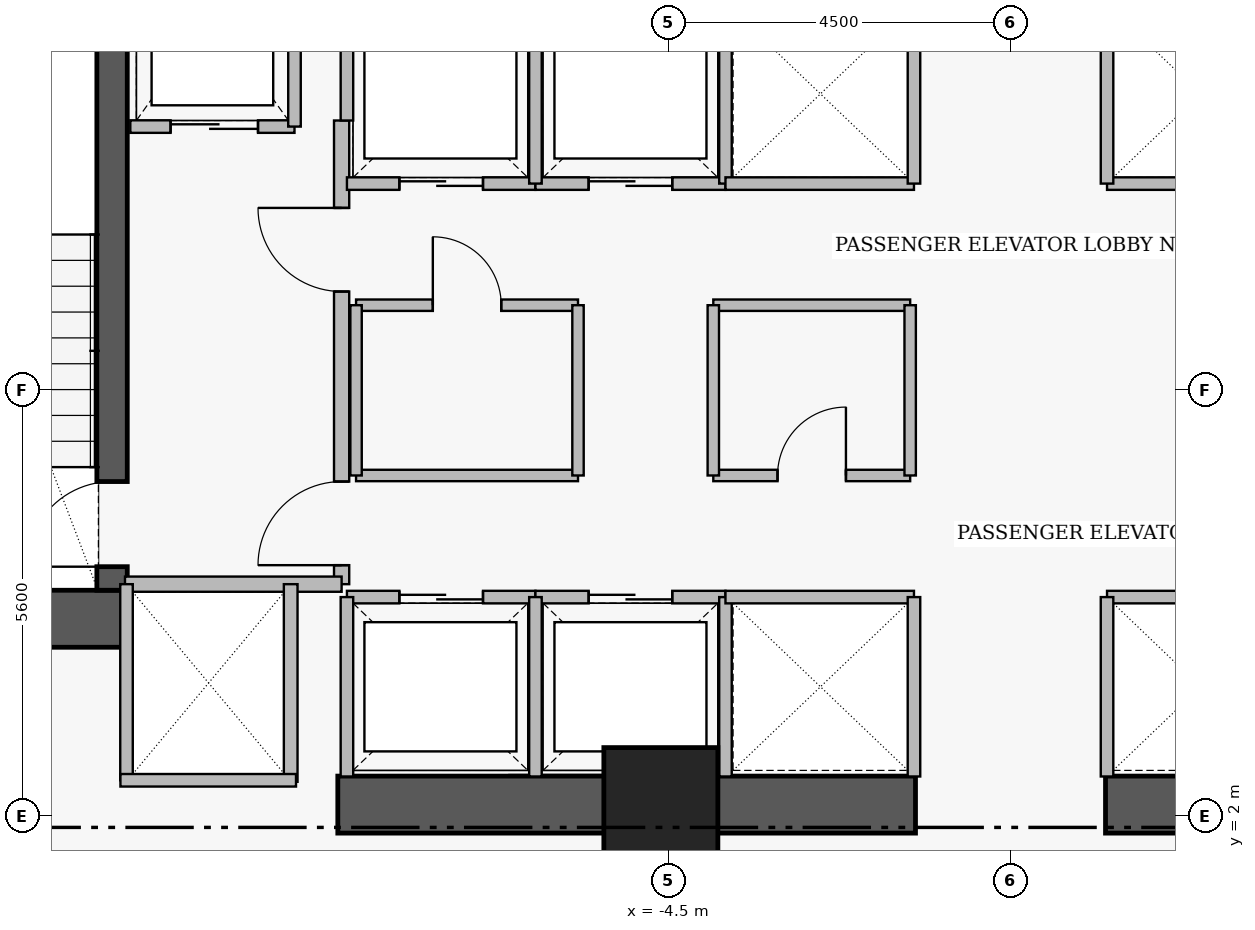
"""IFC4 building model, lengths in metres.
Left out: names, types, materials, properties, quantities, classifications, styles, units other than length and angle.
Written with IfcOpenShell. Run it as: python <this file> out.ifc"""

import sys

from ifc_helpers import new_model, si_unit, direction, frame, frame_2d, origin, origin_2d, place, context, subcontext, project, spatial, rectangle, extrude, element, fill, save


model = new_model("IFC4")
c1 = context("Model", 3, precision=1e-05, world=origin(), true_north=direction((0.0, 1.0)))
c2 = subcontext(c1, "Body", "Model", "MODEL_VIEW")
j1 = project(units=[si_unit("LENGTHUNIT", "METRE"), si_unit("PLANEANGLEUNIT", "RADIAN")], contexts=[c1])
p1 = place(None, origin())
s1 = spatial("IfcSite", under=j1, at=p1, CompositionType="ELEMENT")
p2 = place(p1, origin())
s2 = spatial("IfcBuilding", under=s1, at=p2, CompositionType="ELEMENT")
p3 = place(p2, frame((0.0, 0.0, 117.55)))
s3 = spatial("IfcBuildingStorey", under=s2, at=p3, CompositionType="ELEMENT", Elevation=117.55)
p4 = place(p3, frame((-16.16, 4.595, 0.0), z_axis=(0.0, 0.0, 1.0), x_axis=(1.0, 0.0, 0.0)))
e1 = element("IfcWall", 1, at=p4, inside=s3, PredefinedType="SHEAR", context=c2, shape_type="SweptSolid", body=[
    extrude(rectangle(XDim=4.56, YDim=0.75, at=frame_2d((2.28, 0.0))), origin(), (0.0, 0.0, 1.0), 3.46),
])
for number, where, z_axis, x_axis in (
    (2, (-8.85, 2.15, 0.0), (0.0, 0.0, 1.0), (1.0, 0.0, 0.0)),
    (3, (1.25, 2.15, 0.0), (0.0, 0.0, 1.0), (1.0, 0.0, 0.0)),
):
    element("IfcWall", number, at=place(p3, frame(where, z_axis=z_axis, x_axis=x_axis)), inside=s3, PredefinedType="SHEAR", context=c2, shape_type="SweptSolid", body=[
        extrude(rectangle(XDim=7.6, YDim=0.75, at=frame_2d((3.8, 0.0))), origin(), (0.0, 0.0, 1.0), 3.43),
    ])
p5 = place(p3, frame((-11.82, 4.97, 0.0), z_axis=(0.0, 0.0, 1.0), x_axis=(0.0, 1.0, 0.0)))
e4 = element("IfcWall", 4, at=p5, inside=s3, PredefinedType="SHEAR", context=c2, shape_type="SweptSolid", body=[
    extrude(rectangle(XDim=8.96, YDim=0.4, at=frame_2d((4.48, 0.0))), origin(), (0.0, 0.0, 1.0), 3.46),
])
p6 = place(p5, frame((0.31, 0.0, 0.0)))
e5 = element("IfcOpeningElement", 5, at=p6, cuts=e4, PredefinedType="OPENING", context=c2, shape_type="SweptSolid", body=[
    extrude(rectangle(XDim=1.12, YDim=2.22, at=frame_2d((0.56, 1.11))), frame((0.0, 0.21, 0.0), z_axis=(0.0, -1.0, 0.0), x_axis=(1.0, 0.0, 0.0)), (0.0, 0.0, 1.0), 0.42),
])
p7 = place(p3, frame((-4.6, 2.15, 0.0), z_axis=(0.0, 0.0, 1.0), x_axis=(1.0, 0.0, 0.0)))
e6 = element("IfcColumn", 6, at=p7, inside=s3, PredefinedType="COLUMN", context=c2, shape_type="SweptSolid", body=[
    extrude(rectangle(XDim=1.5, YDim=1.5, at=origin_2d()), origin(), (0.0, 0.0, 1.0), 3.65),
])
p8 = place(p3, frame((-8.8, 5.05, 0.0), z_axis=(0.0, 0.0, 1.0), x_axis=(0.0, 1.0, 0.0)))
e7 = element("IfcWall", 7, at=p8, inside=s3, PredefinedType="PARTITIONING", context=c2, shape_type="SweptSolid", body=[
    extrude(rectangle(XDim=6.1, YDim=0.2, at=frame_2d((3.05, 0.0))), origin(), (0.0, 0.0, 1.0), 3.43),
])
p9 = place(p8, frame((0.25, 0.0, 0.0)))
e8 = element("IfcOpeningElement", 8, at=p9, cuts=e7, PredefinedType="OPENING", context=c2, shape_type="SweptSolid", body=[
    extrude(rectangle(XDim=1.1, YDim=2.2, at=frame_2d((0.55, 1.1))), frame((0.0, 0.11, 0.0), z_axis=(0.0, -1.0, 0.0), x_axis=(1.0, 0.0, 0.0)), (0.0, 0.0, 1.0), 0.22),
])
p10 = place(p8, frame((3.85, 0.0, 0.0)))
e9 = element("IfcOpeningElement", 9, at=p10, cuts=e7, PredefinedType="OPENING", context=c2, shape_type="SweptSolid", body=[
    extrude(rectangle(XDim=1.1, YDim=2.2, at=frame_2d((0.55, 1.1))), frame((0.0, 0.11, 0.0), z_axis=(0.0, -1.0, 0.0), x_axis=(1.0, 0.0, 0.0)), (0.0, 0.0, 1.0), 0.22),
])
p11 = place(p3, frame((-11.58, 11.07, 0.0), z_axis=(0.0, 0.0, 1.0), x_axis=(1.0, 0.0, 0.0)))
e10 = element("IfcWall", 10, at=p11, inside=s3, PredefinedType="PARTITIONING", context=c2, shape_type="SweptSolid", body=[
    extrude(rectangle(XDim=2.16, YDim=0.165, at=frame_2d((1.08, 0.0))), origin(), (0.0, 0.0, 1.0), 3.43),
])
p12 = place(p11, frame((0.53, 0.0, 0.0)))
e11 = element("IfcOpeningElement", 11, at=p12, cuts=e10, PredefinedType="OPENING", context=c2, shape_type="SweptSolid", body=[
    extrude(rectangle(XDim=1.15, YDim=2.25, at=frame_2d((0.575, 1.125))), frame((0.0, 0.093, 0.0), z_axis=(0.0, -1.0, 0.0), x_axis=(1.0, 0.0, 0.0)), (0.0, 0.0, 1.0), 0.185),
])
p13 = place(p3, frame((-8.73, 4.88, 0.0), z_axis=(0.0, 0.0, 1.0), x_axis=(1.0, 0.0, 0.0)))
e12 = element("IfcWall", 12, at=p13, inside=s3, PredefinedType="PARTITIONING", context=c2, shape_type="SweptSolid", body=[
    extrude(rectangle(XDim=2.48, YDim=0.165, at=frame_2d((1.24, 0.0))), origin(), (0.0, 0.0, 1.0), 3.43),
])
p14 = place(p13, frame((0.69, 0.0, 0.0)))
e13 = element("IfcOpeningElement", 13, at=p14, cuts=e12, PredefinedType="OPENING", context=c2, shape_type="SweptSolid", body=[
    extrude(rectangle(XDim=1.1, YDim=2.25, at=frame_2d((0.55, 1.125))), frame((0.0, 0.093, 0.0), z_axis=(0.0, -1.0, 0.0), x_axis=(1.0, 0.0, 0.0)), (0.0, 0.0, 1.0), 0.185),
])
p15 = place(p3, frame((-6.25, 4.88, 0.0), z_axis=(0.0, 0.0, 1.0), x_axis=(1.0, 0.0, 0.0)))
e14 = element("IfcWall", 14, at=p15, inside=s3, PredefinedType="PARTITIONING", context=c2, shape_type="SweptSolid", body=[
    extrude(rectangle(XDim=2.5, YDim=0.165, at=frame_2d((1.25, 0.0))), origin(), (0.0, 0.0, 1.0), 3.43),
])
p16 = place(p15, frame((0.7, 0.0, 0.0)))
e15 = element("IfcOpeningElement", 15, at=p16, cuts=e14, PredefinedType="OPENING", context=c2, shape_type="SweptSolid", body=[
    extrude(rectangle(XDim=1.1, YDim=2.25, at=frame_2d((0.55, 1.125))), frame((0.0, 0.093, 0.0), z_axis=(0.0, -1.0, 0.0), x_axis=(1.0, 0.0, 0.0)), (0.0, 0.0, 1.0), 0.185),
])
p17 = place(p3, frame((-8.73, 10.32, 0.0), z_axis=(0.0, 0.0, 1.0), x_axis=(1.0, 0.0, 0.0)))
e16 = element("IfcWall", 16, at=p17, inside=s3, PredefinedType="PARTITIONING", context=c2, shape_type="SweptSolid", body=[
    extrude(rectangle(XDim=2.48, YDim=0.165, at=frame_2d((1.24, 0.0))), origin(), (0.0, 0.0, 1.0), 3.43),
])
p18 = place(p17, frame((0.69, 0.0, 0.0)))
e17 = element("IfcOpeningElement", 17, at=p18, cuts=e16, PredefinedType="OPENING", context=c2, shape_type="SweptSolid", body=[
    extrude(rectangle(XDim=1.1, YDim=2.25, at=frame_2d((0.55, 1.125))), frame((0.0, 0.093, 0.0), z_axis=(0.0, -1.0, 0.0), x_axis=(1.0, 0.0, 0.0)), (0.0, 0.0, 1.0), 0.185),
])
p19 = place(p3, frame((-6.25, 10.32, 0.0), z_axis=(0.0, 0.0, 1.0), x_axis=(1.0, 0.0, 0.0)))
e18 = element("IfcWall", 18, at=p19, inside=s3, PredefinedType="PARTITIONING", context=c2, shape_type="SweptSolid", body=[
    extrude(rectangle(XDim=2.5, YDim=0.165, at=frame_2d((1.25, 0.0))), origin(), (0.0, 0.0, 1.0), 3.43),
])
p20 = place(p19, frame((0.7, 0.0, 0.0)))
e19 = element("IfcOpeningElement", 19, at=p20, cuts=e18, PredefinedType="OPENING", context=c2, shape_type="SweptSolid", body=[
    extrude(rectangle(XDim=1.1, YDim=2.25, at=frame_2d((0.55, 1.125))), frame((0.0, 0.093, 0.0), z_axis=(0.0, -1.0, 0.0), x_axis=(1.0, 0.0, 0.0)), (0.0, 0.0, 1.0), 0.185),
])
p21 = place(p3, frame((-8.61, 8.72, 0.0), z_axis=(0.0, 0.0, 1.0), x_axis=(1.0, 0.0, 0.0)))
e20 = element("IfcWall", 20, at=p21, inside=s3, PredefinedType="PARTITIONING", context=c2, shape_type="SweptSolid", body=[
    extrude(rectangle(XDim=2.92, YDim=0.15, at=frame_2d((1.46, 0.0))), origin(), (0.0, 0.0, 1.0), 3.43),
])
p22 = place(p21, frame((1.01, 0.0, 0.0)))
e21 = element("IfcOpeningElement", 21, at=p22, cuts=e20, PredefinedType="OPENING", context=c2, shape_type="SweptSolid", body=[
    extrude(rectangle(XDim=0.9, YDim=2.15, at=frame_2d((0.45, 1.075))), frame((0.0, 0.085, 0.0), z_axis=(0.0, -1.0, 0.0), x_axis=(1.0, 0.0, 0.0)), (0.0, 0.0, 1.0), 0.17),
])
p23 = place(p3, frame((-3.91, 6.48, 0.0), z_axis=(0.0, 0.0, 1.0), x_axis=(1.0, 0.0, 0.0)))
e22 = element("IfcWall", 22, at=p23, inside=s3, PredefinedType="PARTITIONING", context=c2, shape_type="SweptSolid", body=[
    extrude(rectangle(XDim=2.59, YDim=0.15, at=frame_2d((1.295, 0.0))), origin(), (0.0, 0.0, 1.0), 3.43),
])
p24 = place(p23, frame((0.845, 0.0, 0.0)))
e23 = element("IfcOpeningElement", 23, at=p24, cuts=e22, PredefinedType="OPENING", context=c2, shape_type="SweptSolid", body=[
    extrude(rectangle(XDim=0.9, YDim=2.15, at=frame_2d((0.45, 1.075))), frame((0.0, 0.085, 0.0), z_axis=(0.0, -1.0, 0.0), x_axis=(1.0, 0.0, 0.0)), (0.0, 0.0, 1.0), 0.17),
])
p25 = place(p3, frame((-11.65, 5.05, 0.0), z_axis=(0.0, 0.0, 1.0), x_axis=(1.0, 0.0, 0.0)))
e24 = element("IfcWall", 24, at=p25, inside=s3, PredefinedType="PARTITIONING", context=c2, shape_type="SweptSolid", body=[
    extrude(rectangle(XDim=2.85, YDim=0.2, at=frame_2d((1.425, 0.0))), origin(), (0.0, 0.0, 1.0), 3.43),
])
p26 = place(p3, frame((-9.42, 11.07, 0.0), z_axis=(0.0, 0.0, 1.0), x_axis=(0.0, 1.0, 0.0)))
e25 = element("IfcWall", 25, at=p26, inside=s3, PredefinedType="PARTITIONING", context=c2, shape_type="SweptSolid", body=[
    extrude(rectangle(XDim=2.96, YDim=0.165, at=frame_2d((1.48, 0.0))), origin(), (0.0, 0.0, 1.0), 3.43),
])
for number, where, z_axis, x_axis in (
    (26, (-8.73, 2.52, 0.0), (0.0, 0.0, 1.0), (0.0, 1.0, 0.0)),
    (27, (-6.25, 2.52, 0.0), (0.0, 0.0, 1.0), (0.0, 1.0, 0.0)),
    (28, (-3.75, 2.52, 0.0), (0.0, 0.0, 1.0), (0.0, 1.0, 0.0)),
):
    element("IfcWall", number, at=place(p3, frame(where, z_axis=z_axis, x_axis=x_axis)), inside=s3, PredefinedType="PARTITIONING", context=c2, shape_type="SweptSolid", body=[
        extrude(rectangle(XDim=2.36, YDim=0.165, at=frame_2d((1.18, 0.0))), origin(), (0.0, 0.0, 1.0), 3.43),
    ])
p27 = place(p3, frame((-8.73, 11.15, 0.0), z_axis=(0.0, 0.0, 1.0), x_axis=(0.0, 1.0, 0.0)))
e29 = element("IfcWall", 29, at=p27, inside=s3, PredefinedType="PARTITIONING", context=c2, shape_type="SweptSolid", body=[
    extrude(rectangle(XDim=1.53, YDim=0.165, at=frame_2d((0.765, 0.0))), origin(), (0.0, 0.0, 1.0), 3.43),
])
for number, where, z_axis, x_axis in (
    (30, (-6.25, 10.32, 0.0), (0.0, 0.0, 1.0), (0.0, 1.0, 0.0)),
    (31, (-3.75, 10.32, 0.0), (0.0, 0.0, 1.0), (0.0, 1.0, 0.0)),
):
    element("IfcWall", number, at=place(p3, frame(where, z_axis=z_axis, x_axis=x_axis)), inside=s3, PredefinedType="PARTITIONING", context=c2, shape_type="SweptSolid", body=[
        extrude(rectangle(XDim=2.36, YDim=0.165, at=frame_2d((1.18, 0.0))), origin(), (0.0, 0.0, 1.0), 3.43),
    ])
p28 = place(p3, frame((-3.75, 4.88, 0.0), z_axis=(0.0, 0.0, 1.0), x_axis=(1.0, 0.0, 0.0)))
e32 = element("IfcWall", 32, at=p28, inside=s3, PredefinedType="PARTITIONING", context=c2, shape_type="SweptSolid", body=[
    extrude(rectangle(XDim=2.48, YDim=0.165, at=frame_2d((1.24, 0.0))), origin(), (0.0, 0.0, 1.0), 3.43),
])
p29 = place(p3, frame((-1.27, 2.52, 0.0), z_axis=(0.0, 0.0, 1.0), x_axis=(0.0, 1.0, 0.0)))
e33 = element("IfcWall", 33, at=p29, inside=s3, PredefinedType="PARTITIONING", context=c2, shape_type="SweptSolid", body=[
    extrude(rectangle(XDim=2.36, YDim=0.165, at=frame_2d((1.18, 0.0))), origin(), (0.0, 0.0, 1.0), 3.43),
])
p30 = place(p3, frame((1.27, 4.88, 0.0), z_axis=(0.0, 0.0, 1.0), x_axis=(1.0, 0.0, 0.0)))
e34 = element("IfcWall", 34, at=p30, inside=s3, PredefinedType="PARTITIONING", context=c2, shape_type="SweptSolid", body=[
    extrude(rectangle(XDim=2.48, YDim=0.165, at=frame_2d((1.24, 0.0))), origin(), (0.0, 0.0, 1.0), 3.43),
])
p31 = place(p3, frame((1.27, 2.52, 0.0), z_axis=(0.0, 0.0, 1.0), x_axis=(0.0, 1.0, 0.0)))
e35 = element("IfcWall", 35, at=p31, inside=s3, PredefinedType="PARTITIONING", context=c2, shape_type="SweptSolid", body=[
    extrude(rectangle(XDim=2.36, YDim=0.165, at=frame_2d((1.18, 0.0))), origin(), (0.0, 0.0, 1.0), 3.43),
])
p32 = place(p3, frame((-3.75, 10.32, 0.0), z_axis=(0.0, 0.0, 1.0), x_axis=(1.0, 0.0, 0.0)))
e36 = element("IfcWall", 36, at=p32, inside=s3, PredefinedType="PARTITIONING", context=c2, shape_type="SweptSolid", body=[
    extrude(rectangle(XDim=2.48, YDim=0.165, at=frame_2d((1.24, 0.0))), origin(), (0.0, 0.0, 1.0), 3.43),
])
p33 = place(p3, frame((-1.27, 10.32, 0.0), z_axis=(0.0, 0.0, 1.0), x_axis=(0.0, 1.0, 0.0)))
e37 = element("IfcWall", 37, at=p33, inside=s3, PredefinedType="PARTITIONING", context=c2, shape_type="SweptSolid", body=[
    extrude(rectangle(XDim=2.36, YDim=0.165, at=frame_2d((1.18, 0.0))), origin(), (0.0, 0.0, 1.0), 3.43),
])
p34 = place(p3, frame((1.27, 10.32, 0.0), z_axis=(0.0, 0.0, 1.0), x_axis=(1.0, 0.0, 0.0)))
e38 = element("IfcWall", 38, at=p34, inside=s3, PredefinedType="PARTITIONING", context=c2, shape_type="SweptSolid", body=[
    extrude(rectangle(XDim=2.48, YDim=0.165, at=frame_2d((1.24, 0.0))), origin(), (0.0, 0.0, 1.0), 3.43),
])
p35 = place(p3, frame((1.27, 10.32, 0.0), z_axis=(0.0, 0.0, 1.0), x_axis=(0.0, 1.0, 0.0)))
e39 = element("IfcWall", 39, at=p35, inside=s3, PredefinedType="PARTITIONING", context=c2, shape_type="SweptSolid", body=[
    extrude(rectangle(XDim=2.36, YDim=0.165, at=frame_2d((1.18, 0.0))), origin(), (0.0, 0.0, 1.0), 3.43),
])
p36 = place(p3, frame((-9.47, 2.45, 0.0), z_axis=(0.0, 0.0, 1.0), x_axis=(0.0, 1.0, 0.0)))
e40 = element("IfcWall", 40, at=p36, inside=s3, PredefinedType="PARTITIONING", context=c2, shape_type="SweptSolid", body=[
    extrude(rectangle(XDim=2.6, YDim=0.18, at=frame_2d((1.3, 0.0))), origin(), (0.0, 0.0, 1.0), 3.43),
])
p37 = place(p3, frame((-11.63, 2.47, 0.0), z_axis=(0.0, 0.0, 1.0), x_axis=(0.0, 1.0, 0.0)))
e41 = element("IfcWall", 41, at=p37, inside=s3, PredefinedType="PARTITIONING", context=c2, shape_type="SweptSolid", body=[
    extrude(rectangle(XDim=2.58, YDim=0.165, at=frame_2d((1.29, 0.0))), origin(), (0.0, 0.0, 1.0), 3.43),
])
p38 = place(p3, frame((-11.71, 2.47, 0.0), z_axis=(0.0, 0.0, 1.0), x_axis=(1.0, 0.0, 0.0)))
e42 = element("IfcWall", 42, at=p38, inside=s3, PredefinedType="PARTITIONING", context=c2, shape_type="SweptSolid", body=[
    extrude(rectangle(XDim=2.31, YDim=0.165, at=frame_2d((1.155, 0.0))), origin(), (0.0, 0.0, 1.0), 2.03),
])
p39 = place(p3, frame((-8.61, 6.48, 0.0), z_axis=(0.0, 0.0, 1.0), x_axis=(1.0, 0.0, 0.0)))
e43 = element("IfcWall", 43, at=p39, inside=s3, PredefinedType="PARTITIONING", context=c2, shape_type="SweptSolid", body=[
    extrude(rectangle(XDim=2.92, YDim=0.15, at=frame_2d((1.46, 0.0))), origin(), (0.0, 0.0, 1.0), 3.43),
])
for number, where, z_axis, x_axis in (
    (44, (-8.61, 6.48, 0.0), (0.0, 0.0, 1.0), (0.0, 1.0, 0.0)),
    (45, (-5.69, 6.48, 0.0), (0.0, 0.0, 1.0), (0.0, 1.0, 0.0)),
):
    element("IfcWall", number, at=place(p3, frame(where, z_axis=z_axis, x_axis=x_axis)), inside=s3, PredefinedType="PARTITIONING", context=c2, shape_type="SweptSolid", body=[
        extrude(rectangle(XDim=2.24, YDim=0.15, at=frame_2d((1.12, 0.0))), origin(), (0.0, 0.0, 1.0), 3.43),
    ])
p40 = place(p3, frame((-3.91, 8.72, 0.0), z_axis=(0.0, 0.0, 1.0), x_axis=(1.0, 0.0, 0.0)))
e46 = element("IfcWall", 46, at=p40, inside=s3, PredefinedType="PARTITIONING", context=c2, shape_type="SweptSolid", body=[
    extrude(rectangle(XDim=2.59, YDim=0.15, at=frame_2d((1.295, 0.0))), origin(), (0.0, 0.0, 1.0), 3.43),
])
for number, where, z_axis, x_axis in (
    (47, (-3.91, 6.48, 0.0), (0.0, 0.0, 1.0), (0.0, 1.0, 0.0)),
    (48, (-1.32, 6.48, 0.0), (0.0, 0.0, 1.0), (0.0, 1.0, 0.0)),
):
    element("IfcWall", number, at=place(p3, frame(where, z_axis=z_axis, x_axis=x_axis)), inside=s3, PredefinedType="PARTITIONING", context=c2, shape_type="SweptSolid", body=[
        extrude(rectangle(XDim=2.24, YDim=0.15, at=frame_2d((1.12, 0.0))), origin(), (0.0, 0.0, 1.0), 3.43),
    ])
p41 = place(p6, origin())
e49 = element("IfcDoor", 49, at=p41, inside=s3, OperationType="SINGLE_SWING_LEFT", PredefinedType="DOOR", context=c2, shape_type="SweptSolid", body=[
    extrude(rectangle(XDim=1.12, YDim=2.22, at=frame_2d((0.56, 1.11))), frame((0.0, 0.025, 0.0), z_axis=(0.0, -1.0, 0.0), x_axis=(1.0, 0.0, 0.0)), (0.0, 0.0, 1.0), 0.05),
])
fill(e5, e49)
p42 = place(p9, origin())
e50 = element("IfcDoor", 50, at=p42, inside=s3, OperationType="SINGLE_SWING_LEFT", PredefinedType="DOOR", context=c2, shape_type="SweptSolid", body=[
    extrude(rectangle(XDim=1.1, YDim=2.2, at=frame_2d((0.55, 1.1))), frame((0.0, 0.025, 0.0), z_axis=(0.0, -1.0, 0.0), x_axis=(1.0, 0.0, 0.0)), (0.0, 0.0, 1.0), 0.05),
])
fill(e8, e50)
p43 = place(p10, origin())
e51 = element("IfcDoor", 51, at=p43, inside=s3, OperationType="SINGLE_SWING_RIGHT", PredefinedType="DOOR", context=c2, shape_type="SweptSolid", body=[
    extrude(rectangle(XDim=1.1, YDim=2.2, at=frame_2d((0.55, 1.1))), frame((0.0, 0.025, 0.0), z_axis=(0.0, -1.0, 0.0), x_axis=(1.0, 0.0, 0.0)), (0.0, 0.0, 1.0), 0.05),
])
fill(e9, e51)
p44 = place(p12, origin())
e52 = element("IfcDoor", 52, at=p44, inside=s3, OperationType="SLIDING_TO_LEFT", PredefinedType="DOOR", context=c2, shape_type="SweptSolid", body=[
    extrude(rectangle(XDim=1.15, YDim=2.25, at=frame_2d((0.575, 1.125))), frame((0.0, 0.025, 0.0), z_axis=(0.0, -1.0, 0.0), x_axis=(1.0, 0.0, 0.0)), (0.0, 0.0, 1.0), 0.05),
])
fill(e11, e52)
p45 = place(p14, origin())
e53 = element("IfcDoor", 53, at=p45, inside=s3, OperationType="SLIDING_TO_LEFT", PredefinedType="DOOR", context=c2, shape_type="SweptSolid", body=[
    extrude(rectangle(XDim=1.1, YDim=2.25, at=frame_2d((0.55, 1.125))), frame((0.0, 0.025, 0.0), z_axis=(0.0, -1.0, 0.0), x_axis=(1.0, 0.0, 0.0)), (0.0, 0.0, 1.0), 0.05),
])
fill(e13, e53)
p46 = place(p16, origin())
e54 = element("IfcDoor", 54, at=p46, inside=s3, OperationType="SLIDING_TO_LEFT", PredefinedType="DOOR", context=c2, shape_type="SweptSolid", body=[
    extrude(rectangle(XDim=1.1, YDim=2.25, at=frame_2d((0.55, 1.125))), frame((0.0, 0.025, 0.0), z_axis=(0.0, -1.0, 0.0), x_axis=(1.0, 0.0, 0.0)), (0.0, 0.0, 1.0), 0.05),
])
fill(e15, e54)
p47 = place(p18, origin())
e55 = element("IfcDoor", 55, at=p47, inside=s3, OperationType="SLIDING_TO_LEFT", PredefinedType="DOOR", context=c2, shape_type="SweptSolid", body=[
    extrude(rectangle(XDim=1.1, YDim=2.25, at=frame_2d((0.55, 1.125))), frame((0.0, 0.025, 0.0), z_axis=(0.0, -1.0, 0.0), x_axis=(1.0, 0.0, 0.0)), (0.0, 0.0, 1.0), 0.05),
])
fill(e17, e55)
p48 = place(p20, origin())
e56 = element("IfcDoor", 56, at=p48, inside=s3, OperationType="SLIDING_TO_LEFT", PredefinedType="DOOR", context=c2, shape_type="SweptSolid", body=[
    extrude(rectangle(XDim=1.1, YDim=2.25, at=frame_2d((0.55, 1.125))), frame((0.0, 0.025, 0.0), z_axis=(0.0, -1.0, 0.0), x_axis=(1.0, 0.0, 0.0)), (0.0, 0.0, 1.0), 0.05),
])
fill(e19, e56)
p49 = place(p22, origin())
e57 = element("IfcDoor", 57, at=p49, inside=s3, OperationType="SINGLE_SWING_LEFT", PredefinedType="DOOR", context=c2, shape_type="SweptSolid", body=[
    extrude(rectangle(XDim=0.9, YDim=2.15, at=frame_2d((0.45, 1.075))), frame((0.0, 0.025, 0.0), z_axis=(0.0, -1.0, 0.0), x_axis=(1.0, 0.0, 0.0)), (0.0, 0.0, 1.0), 0.05),
])
fill(e21, e57)
p50 = place(p24, origin())
e58 = element("IfcDoor", 58, at=p50, inside=s3, OperationType="SINGLE_SWING_RIGHT", PredefinedType="DOOR", context=c2, shape_type="SweptSolid", body=[
    extrude(rectangle(XDim=0.9, YDim=2.15, at=frame_2d((0.45, 1.075))), frame((0.0, 0.025, 0.0), z_axis=(0.0, -1.0, 0.0), x_axis=(1.0, 0.0, 0.0)), (0.0, 0.0, 1.0), 0.05),
])
fill(e23, e58)
save(model, sys.argv[1])
